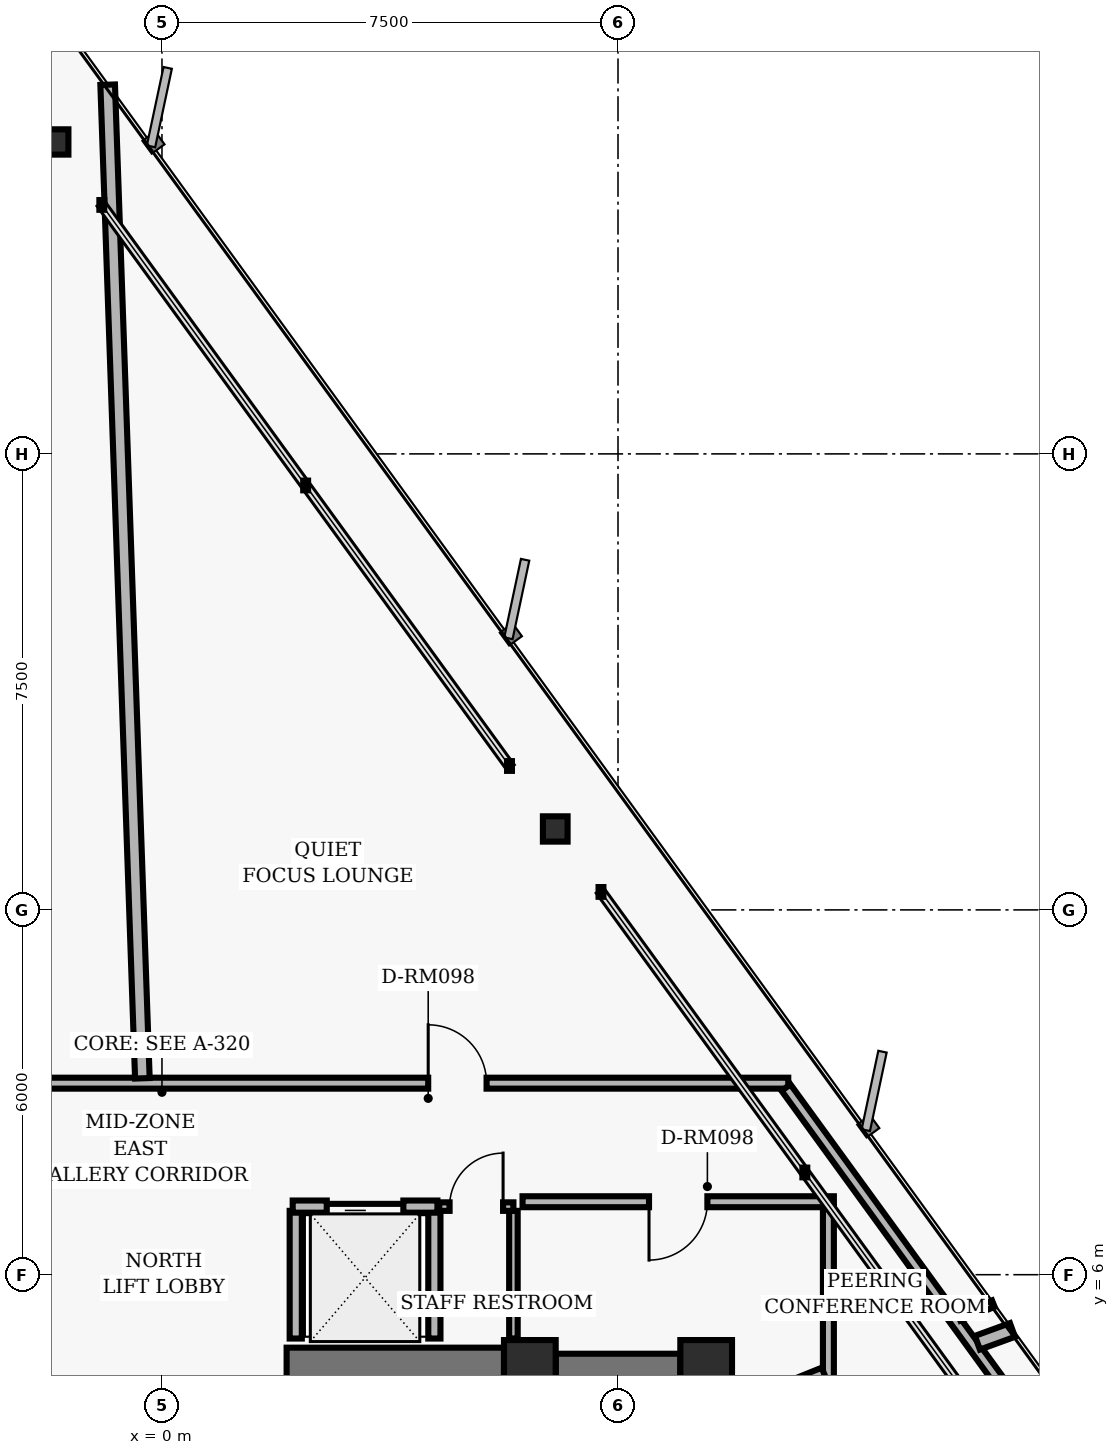
"""IFC4 building model, lengths in metres.
Left out: names, types, materials, properties, quantities, classifications, styles, units other than length and angle.
Written with IfcOpenShell. Run it as: python <this file> out.ifc"""

import sys

from ifc_helpers import new_model, si_unit, direction, frame, frame_2d, origin, origin_2d, place, context, subcontext, project, spatial, rectangle, hollow_rectangle, i_section, extrude, element, fill, save


model = new_model("IFC4")
c1 = context("Model", 3, precision=1e-05, world=origin(), true_north=direction((0.0, 1.0)))
c2 = subcontext(c1, "Body", "Model", "MODEL_VIEW")
j1 = project(units=[si_unit("LENGTHUNIT", "METRE"), si_unit("PLANEANGLEUNIT", "RADIAN")], contexts=[c1])
p1 = place(None, origin())
s1 = spatial("IfcSite", under=j1, at=p1, CompositionType="ELEMENT")
p2 = place(p1, origin())
s2 = spatial("IfcBuilding", under=s1, at=p2, CompositionType="ELEMENT")
p3 = place(p2, frame((0.0, 0.0, 119.84)))
s3 = spatial("IfcBuildingStorey", under=s2, at=p3, CompositionType="ELEMENT", Elevation=119.84)
for number, where, z_axis, x_axis in (
    (1, (6.05, 4.5, 0.0), (0.0, 0.0, 1.0), (1.0, 0.0, 0.0)),
    (2, (8.95, 4.5, 0.0), (0.0, 0.0, 1.0), (1.0, 0.0, 0.0)),
):
    element("IfcColumn", number, at=place(p3, frame(where, z_axis=z_axis, x_axis=x_axis)), inside=s3, PredefinedType="COLUMN", context=c2, shape_type="SweptSolid", body=[
        extrude(hollow_rectangle(XDim=0.85, YDim=0.85, WallThickness=0.055, InnerFilletRadius=0.02, OuterFilletRadius=0.04, at=origin_2d()), origin(), (0.0, 0.0, 1.0), 3.04),
    ])
p4 = place(p3, frame((2.05, 4.5, 0.0), z_axis=(0.0, 0.0, 1.0), x_axis=(1.0, 0.0, 0.0)))
e3 = element("IfcWall", 3, at=p4, inside=s3, PredefinedType="SHEAR", context=c2, shape_type="SweptSolid", body=[
    extrude(rectangle(XDim=3.575, YDim=0.6, at=frame_2d((1.788, 0.0))), origin(), (0.0, 0.0, 1.0), 2.788),
])
p5 = place(p3, frame((6.475, 4.5, 0.0), z_axis=(0.0, 0.0, 1.0), x_axis=(1.0, 0.0, 0.0)))
e4 = element("IfcWall", 4, at=p5, inside=s3, PredefinedType="SHEAR", context=c2, shape_type="SweptSolid", body=[
    extrude(rectangle(XDim=2.05, YDim=0.4, at=frame_2d((1.025, 0.0))), origin(), (0.0, 0.0, 1.0), 2.788),
])
for number, where, z_axis, x_axis in (
    (5, (6.468, 13.331, 0.0), (0.0, 0.0, 1.0), (1.0, 0.0, 0.0)),
    (6, (-1.742, 24.63, 0.0), (0.0, 0.0, 1.0), (1.0, 0.0, 0.0)),
):
    element("IfcColumn", number, at=place(p3, frame(where, z_axis=z_axis, x_axis=x_axis)), inside=s3, PredefinedType="COLUMN", context=c2, shape_type="SweptSolid", body=[
        extrude(i_section(OverallWidth=0.406, OverallDepth=0.416, WebThickness=0.03, FlangeThickness=0.048, FilletRadius=0.02, at=origin_2d()), origin(), (0.0, 0.0, 1.0), 3.04),
    ])
p6 = place(p3, frame((2.2, 4.95, 0.0), z_axis=(0.0, 0.0, 1.0), x_axis=(0.0, 1.0, 0.0)))
e7 = element("IfcWall", 7, at=p6, inside=s3, PredefinedType="PARTITIONING", context=c2, shape_type="SweptSolid", body=[
    extrude(rectangle(XDim=2.1, YDim=0.2, at=frame_2d((1.05, 0.0))), origin(), (0.0, 0.0, 1.0), 2.132),
])
p7 = place(p3, frame((4.48, 4.95, 0.0), z_axis=(0.0, 0.0, 1.0), x_axis=(0.0, 1.0, 0.0)))
e8 = element("IfcWall", 8, at=p7, inside=s3, PredefinedType="PARTITIONING", context=c2, shape_type="SweptSolid", body=[
    extrude(rectangle(XDim=2.1, YDim=0.2, at=frame_2d((1.05, 0.0))), origin(), (0.0, 0.0, 1.0), 2.763),
])
p8 = place(p3, frame((2.15, 7.12, 0.0), z_axis=(0.0, 0.0, 1.0), x_axis=(1.0, 0.0, 0.0)))
e9 = element("IfcWall", 9, at=p8, inside=s3, PredefinedType="PARTITIONING", context=c2, shape_type="SweptSolid", body=[
    extrude(rectangle(XDim=2.38, YDim=0.2, at=frame_2d((1.19, 0.0))), origin(), (0.0, 0.0, 1.0), 2.763),
])
p9 = place(p8, frame((0.56, 0.0, 0.0)))
e10 = element("IfcOpeningElement", 10, at=p9, cuts=e9, PredefinedType="OPENING", context=c2, shape_type="SweptSolid", body=[
    extrude(rectangle(XDim=1.26, YDim=2.06, at=frame_2d((0.63, 1.03))), frame((0.0, 0.11, 0.0), z_axis=(0.0, -1.0, 0.0), x_axis=(1.0, 0.0, 0.0)), (0.0, 0.0, 1.0), 0.22),
])
p10 = place(p3, frame((5.78, 4.95, 0.0), z_axis=(0.0, 0.0, 1.0), x_axis=(0.0, 1.0, 0.0)))
e11 = element("IfcWall", 11, at=p10, inside=s3, PredefinedType="PARTITIONING", context=c2, shape_type="SweptSolid", body=[
    extrude(rectangle(XDim=2.1, YDim=0.14, at=frame_2d((1.05, 0.0))), origin(), (0.0, 0.0, 1.0), 2.132),
])
p11 = place(p3, frame((4.56, 7.12, 0.0), z_axis=(0.0, 0.0, 1.0), x_axis=(1.0, 0.0, 0.0)))
e12 = element("IfcWall", 12, at=p11, inside=s3, PredefinedType="PARTITIONING", context=c2, shape_type="SweptSolid", body=[
    extrude(rectangle(XDim=1.22, YDim=0.14, at=frame_2d((0.61, 0.0))), origin(), (0.0, 0.0, 1.0), 2.763),
])
p12 = place(p11, frame((0.17, 0.0, 0.0)))
e13 = element("IfcOpeningElement", 13, at=p12, cuts=e12, PredefinedType="OPENING", context=c2, shape_type="SweptSolid", body=[
    extrude(rectangle(XDim=0.88, YDim=2.02, at=frame_2d((0.44, 1.01))), frame((0.0, 0.08, 0.0), z_axis=(0.0, -1.0, 0.0), x_axis=(1.0, 0.0, 0.0)), (0.0, 0.0, 1.0), 0.16),
])
p13 = place(p3, frame((-6.52, 9.15, 0.0), z_axis=(0.0, 0.0, 1.0), x_axis=(1.0, 0.0, 0.0)))
e14 = element("IfcWall", 14, at=p13, inside=s3, PredefinedType="PARTITIONING", context=c2, shape_type="SweptSolid", body=[
    extrude(rectangle(XDim=16.82, YDim=0.18, at=frame_2d((8.41, 0.0))), origin(), (0.0, 0.0, 1.0), 2.763),
])
p14 = place(p13, frame((10.898, 0.0, 0.0)))
e15 = element("IfcOpeningElement", 15, at=p14, cuts=e14, PredefinedType="OPENING", context=c2, shape_type="SweptSolid", body=[
    extrude(rectangle(XDim=0.96, YDim=2.02, at=frame_2d((0.48, 1.01))), frame((0.0, 0.1, 0.0), z_axis=(0.0, -1.0, 0.0), x_axis=(1.0, 0.0, 0.0)), (0.0, 0.0, 1.0), 0.2),
])
p15 = place(p13, frame((2.749, 0.0, 0.0)))
e16 = element("IfcOpeningElement", 16, at=p15, cuts=e14, PredefinedType="OPENING", context=c2, shape_type="SweptSolid", body=[
    extrude(rectangle(XDim=0.96, YDim=2.02, at=frame_2d((0.48, 1.01))), frame((0.0, 0.1, 0.0), z_axis=(0.0, -1.0, 0.0), x_axis=(1.0, 0.0, 0.0)), (0.0, 0.0, 1.0), 0.2),
])
p16 = place(p3, frame((10.263, 9.077, 0.0), z_axis=(0.0, 0.0, 1.0), x_axis=(0.587780951295, -0.809020119215, 0.0)))
e17 = element("IfcWall", 17, at=p16, inside=s3, PredefinedType="PARTITIONING", context=c2, shape_type="SweptSolid", body=[
    extrude(rectangle(XDim=7.469, YDim=0.18, at=frame_2d((3.734, 0.0))), origin(), (0.0, 0.0, 1.0), 2.763),
])
p17 = place(p3, frame((10.96, 3.84, 0.0), z_axis=(0.0, 0.0, 1.0), x_axis=(0.0, 1.0, 0.0)))
e18 = element("IfcWall", 18, at=p17, inside=s3, PredefinedType="PARTITIONING", context=c2, shape_type="SweptSolid", body=[
    extrude(rectangle(XDim=3.271, YDim=0.18, at=frame_2d((1.635, 0.0))), origin(), (0.0, 0.0, 1.0), 2.763),
])
p18 = place(p3, frame((11.05, 7.2, 0.0), z_axis=(0.0, 0.0, 1.0), x_axis=(-1.0, 0.0, 0.0)))
e19 = element("IfcWall", 19, at=p18, inside=s3, PredefinedType="PARTITIONING", context=c2, shape_type="SweptSolid", body=[
    extrude(rectangle(XDim=5.12, YDim=0.18, at=frame_2d((2.56, 0.0))), origin(), (0.0, 0.0, 1.0), 2.763),
])
p19 = place(p18, frame((2.08, 0.0, 0.0)))
e20 = element("IfcOpeningElement", 20, at=p19, cuts=e19, PredefinedType="OPENING", context=c2, shape_type="SweptSolid", body=[
    extrude(rectangle(XDim=0.96, YDim=2.02, at=frame_2d((0.48, 1.01))), frame((0.0, 0.1, 0.0), z_axis=(0.0, -1.0, 0.0), x_axis=(1.0, 0.0, 0.0)), (0.0, 0.0, 1.0), 0.2),
])
p20 = place(p3, frame((13.41, 4.881, 0.0), z_axis=(0.0, 0.0, 1.0), x_axis=(0.939828255983, 0.341647258523, 0.0)))
e21 = element("IfcWall", 21, at=p20, inside=s3, PredefinedType="PARTITIONING", context=c2, shape_type="SweptSolid", body=[
    extrude(rectangle(XDim=0.614, YDim=0.24, at=frame_2d((0.307, 0.0))), origin(), (0.0, 0.0, 1.0), 2.763),
])
p21 = place(p3, frame((10.024, 4.05, 0.0), z_axis=(0.0, 0.0, 1.0), x_axis=(0.927194137639, 0.374581140912, 0.0)))
e22 = element("IfcWall", 22, at=p21, inside=s3, PredefinedType="PARTITIONING", context=c2, shape_type="SweptSolid", body=[
    extrude(rectangle(XDim=0.923, YDim=0.16, at=frame_2d((0.461, 0.0))), origin(), (0.0, 0.0, 1.0), 2.763),
])
p22 = place(p3, frame((13.109, 5.296, 0.0), z_axis=(0.0, 0.0, 1.0), x_axis=(0.927169426613, 0.374642301875, 0.0)))
e23 = element("IfcWall", 23, at=p22, inside=s3, PredefinedType="MOVABLE", context=c2, shape_type="SweptSolid", body=[
    extrude(rectangle(XDim=0.608, YDim=0.115, at=frame_2d((0.304, 0.0))), origin(), (0.0, 0.0, 1.0), 2.763),
])
p23 = place(p3, frame((-0.322, 9.23, 0.0), z_axis=(0.0, 0.0, 1.0), x_axis=(-0.034907078812, 0.999390562217, 0.0)))
e24 = element("IfcWall", 24, at=p23, inside=s3, PredefinedType="PARTITIONING", context=c2, shape_type="SweptSolid", body=[
    extrude(rectangle(XDim=16.352, YDim=0.24, at=frame_2d((8.176, 0.0))), origin(), (0.0, 0.0, 1.0), 2.132),
])
p24 = place(p9, origin())
e25 = element("IfcDoor", 25, at=p24, inside=s3, OperationType="SLIDING_TO_LEFT", PredefinedType="DOOR", context=c2, shape_type="SweptSolid", body=[
    extrude(rectangle(XDim=1.26, YDim=2.06, at=frame_2d((0.63, 1.03))), frame((0.0, 0.025, 0.0), z_axis=(0.0, -1.0, 0.0), x_axis=(1.0, 0.0, 0.0)), (0.0, 0.0, 1.0), 0.05),
])
fill(e10, e25)
p25 = place(p12, origin())
e26 = element("IfcDoor", 26, at=p25, inside=s3, OperationType="SINGLE_SWING_RIGHT", PredefinedType="DOOR", context=c2, shape_type="SweptSolid", body=[
    extrude(rectangle(XDim=0.88, YDim=2.02, at=frame_2d((0.44, 1.01))), frame((0.0, 0.025, 0.0), z_axis=(0.0, -1.0, 0.0), x_axis=(1.0, 0.0, 0.0)), (0.0, 0.0, 1.0), 0.05),
])
fill(e13, e26)
p26 = place(p19, origin())
e27 = element("IfcDoor", 27, at=p26, inside=s3, OperationType="SINGLE_SWING_RIGHT", PredefinedType="DOOR", context=c2, shape_type="SweptSolid", body=[
    extrude(rectangle(XDim=0.96, YDim=2.02, at=frame_2d((0.48, 1.01))), frame((0.0, 0.025, 0.0), z_axis=(0.0, -1.0, 0.0), x_axis=(1.0, 0.0, 0.0)), (0.0, 0.0, 1.0), 0.05),
])
fill(e20, e27)
p27 = place(p14, origin())
e28 = element("IfcDoor", 28, at=p27, inside=s3, OperationType="SINGLE_SWING_LEFT", PredefinedType="DOOR", context=c2, shape_type="SweptSolid", body=[
    extrude(rectangle(XDim=0.96, YDim=2.02, at=frame_2d((0.48, 1.01))), frame((0.0, 0.025, 0.0), z_axis=(0.0, -1.0, 0.0), x_axis=(1.0, 0.0, 0.0)), (0.0, 0.0, 1.0), 0.05),
])
fill(e15, e28)
save(model, sys.argv[1])
